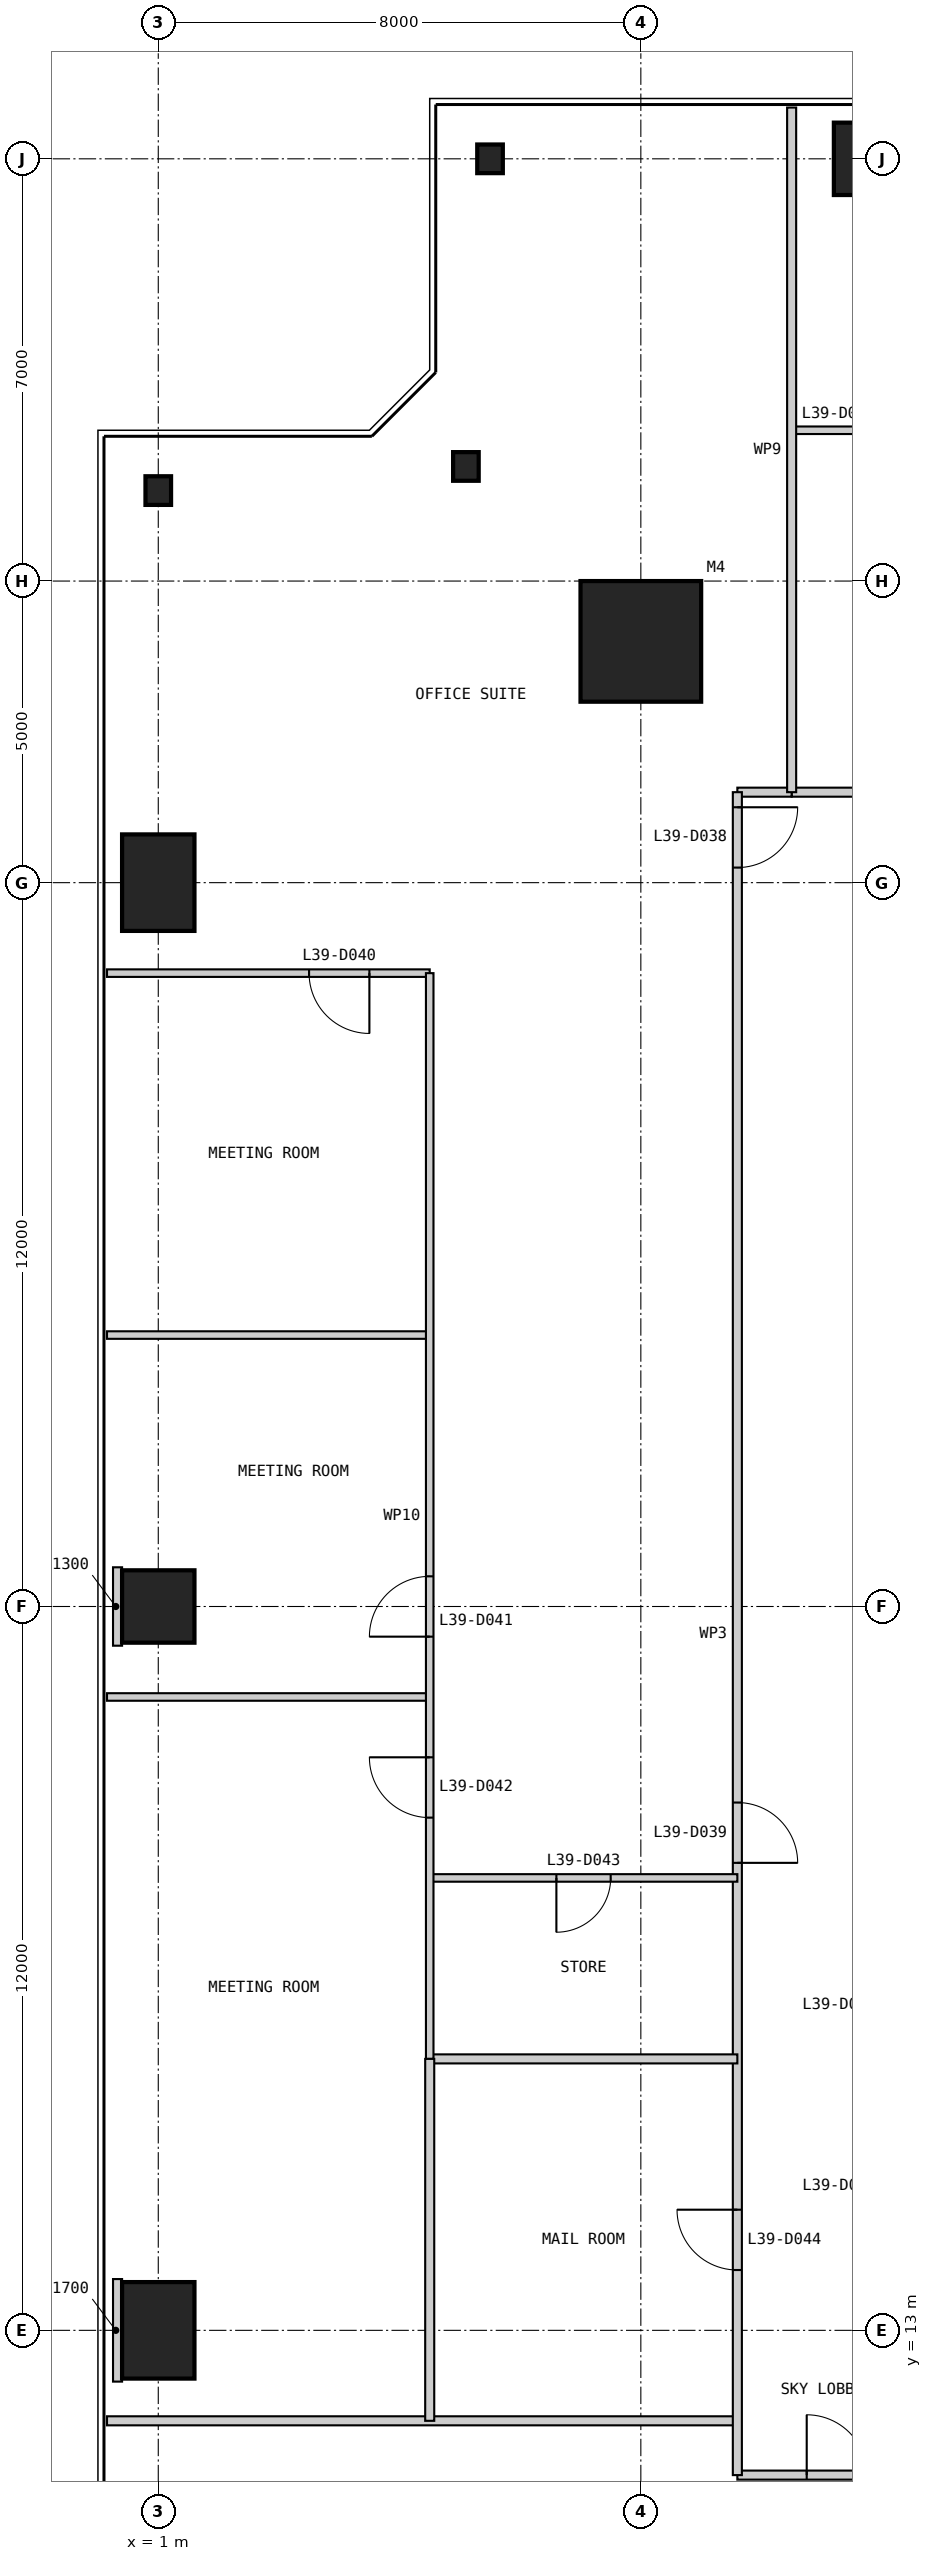
"""IFC4 building model, lengths in metres.
Left out: names, types, materials, properties, quantities, classifications, styles, units other than length and angle.
Written with IfcOpenShell. Run it as: python <this file> out.ifc"""

import sys

from ifc_helpers import new_model, si_unit, direction, frame, frame_2d, origin, origin_2d, place, context, subcontext, project, spatial, rectangle, i_section, extrude, element, fill, save


model = new_model("IFC4")
c1 = context("Model", 3, precision=1e-05, world=origin(), true_north=direction((0.0, 1.0)))
c2 = subcontext(c1, "Body", "Model", "MODEL_VIEW")
j1 = project(units=[si_unit("LENGTHUNIT", "METRE"), si_unit("PLANEANGLEUNIT", "RADIAN")], contexts=[c1])
p1 = place(None, origin())
s1 = spatial("IfcSite", under=j1, at=p1, CompositionType="ELEMENT")
p2 = place(p1, origin())
s2 = spatial("IfcBuilding", under=s1, at=p2, CompositionType="ELEMENT")
p3 = place(p2, frame((0.0, 0.0, 168.4)))
s3 = spatial("IfcBuildingStorey", under=s2, at=p3, CompositionType="ELEMENT", Elevation=168.4)
p4 = place(p3, frame((9.0, 41.0, 0.0), z_axis=(0.0, 0.0, 1.0), x_axis=(1.0, 0.0, 0.0)))
e1 = element("IfcColumn", 1, at=p4, inside=s3, PredefinedType="COLUMN", context=c2, shape_type="SweptSolid", body=[
    extrude(rectangle(XDim=2.0, YDim=2.0, at=origin_2d()), origin(), (0.0, 0.0, 1.0), 5.4),
])
p5 = place(p3, frame((13.0, 49.0, 0.0), z_axis=(0.0, 0.0, 1.0), x_axis=(1.0, 0.0, 0.0)))
e2 = element("IfcColumn", 2, at=p5, inside=s3, PredefinedType="COLUMN", context=c2, shape_type="SweptSolid", body=[
    extrude(rectangle(XDim=1.6, YDim=1.2, at=origin_2d()), origin(), (0.0, 0.0, 1.0), 5.4),
])
for number, where, z_axis, x_axis in (
    (3, (6.5, 49.0, 0.0), (0.0, 0.0, 1.0), (1.0, 0.0, 0.0)),
    (4, (6.1, 43.9, 0.0), (0.0, 0.0, 1.0), (1.0, 0.0, 0.0)),
    (5, (1.0, 43.5, 0.0), (0.0, 0.0, 1.0), (1.0, 0.0, 0.0)),
):
    element("IfcColumn", number, at=place(p3, frame(where, z_axis=z_axis, x_axis=x_axis)), inside=s3, PredefinedType="COLUMN", context=c2, shape_type="SweptSolid", body=[
        extrude(i_section(OverallWidth=0.424, OverallDepth=0.475, WebThickness=0.048, FlangeThickness=0.077, at=origin_2d()), origin(), (0.0, 0.0, 1.0), 5.4),
    ])
p6 = place(p3, frame((1.0, 37.0, 0.0), z_axis=(0.0, 0.0, 1.0), x_axis=(1.0, 0.0, 0.0)))
e6 = element("IfcColumn", 6, at=p6, inside=s3, PredefinedType="COLUMN", context=c2, shape_type="SweptSolid", body=[
    extrude(rectangle(XDim=1.2, YDim=1.6, at=origin_2d()), origin(), (0.0, 0.0, 1.0), 5.4),
])
p7 = place(p3, frame((1.0, 25.0, 0.0), z_axis=(0.0, 0.0, 1.0), x_axis=(1.0, 0.0, 0.0)))
e7 = element("IfcColumn", 7, at=p7, inside=s3, PredefinedType="COLUMN", context=c2, shape_type="SweptSolid", body=[
    extrude(rectangle(XDim=1.2, YDim=1.2, at=origin_2d()), origin(), (0.0, 0.0, 1.0), 5.4),
])
p8 = place(p3, frame((1.0, 13.0, 0.0), z_axis=(0.0, 0.0, 1.0), x_axis=(1.0, 0.0, 0.0)))
e8 = element("IfcColumn", 8, at=p8, inside=s3, PredefinedType="COLUMN", context=c2, shape_type="SweptSolid", body=[
    extrude(rectangle(XDim=1.2, YDim=1.6, at=origin_2d()), origin(), (0.0, 0.0, 1.0), 5.4),
])
p9 = place(p3, frame((10.6, 10.6, 0.0), z_axis=(0.0, 0.0, 1.0), x_axis=(1.0, 0.0, 0.0)))
e9 = element("IfcWall", 9, at=p9, inside=s3, PredefinedType="PARTITIONING", context=c2, shape_type="SweptSolid", body=[
    extrude(rectangle(XDim=28.8, YDim=0.15, at=frame_2d((14.4, 0.0))), origin(), (0.0, 0.0, 1.0), 5.25),
])
p10 = place(p9, frame((1.15, 0.0, 0.0)))
e10 = element("IfcOpeningElement", 10, at=p10, cuts=e9, PredefinedType="OPENING", context=c2, shape_type="SweptSolid", body=[
    extrude(rectangle(XDim=1.0, YDim=2.2, at=frame_2d((0.5, 1.1))), frame((0.0, 0.085, 0.0), z_axis=(0.0, -1.0, 0.0), x_axis=(1.0, 0.0, 0.0)), (0.0, 0.0, 1.0), 0.17),
])
p11 = place(p9, frame((11.65, 0.0, 0.0)))
e11 = element("IfcOpeningElement", 11, at=p11, cuts=e9, PredefinedType="OPENING", context=c2, shape_type="SweptSolid", body=[
    extrude(rectangle(XDim=1.0, YDim=2.2, at=frame_2d((0.5, 1.1))), frame((0.0, 0.085, 0.0), z_axis=(0.0, -1.0, 0.0), x_axis=(1.0, 0.0, 0.0)), (0.0, 0.0, 1.0), 0.17),
])
p12 = place(p9, frame((16.9, 0.0, 0.0)))
e12 = element("IfcOpeningElement", 12, at=p12, cuts=e9, PredefinedType="OPENING", context=c2, shape_type="SweptSolid", body=[
    extrude(rectangle(XDim=1.0, YDim=2.2, at=frame_2d((0.5, 1.1))), frame((0.0, 0.085, 0.0), z_axis=(0.0, -1.0, 0.0), x_axis=(1.0, 0.0, 0.0)), (0.0, 0.0, 1.0), 0.17),
])
p13 = place(p3, frame((0.15, 11.5, 0.0), z_axis=(0.0, 0.0, 1.0), x_axis=(1.0, 0.0, 0.0)))
e13 = element("IfcWall", 13, at=p13, inside=s3, PredefinedType="PARTITIONING", context=c2, shape_type="SweptSolid", body=[
    extrude(rectangle(XDim=10.45, YDim=0.15, at=frame_2d((5.225, 0.0))), origin(), (0.0, 0.0, 1.0), 5.25),
])
p14 = place(p3, frame((38.5, 38.5, 0.0), z_axis=(0.0, 0.0, 1.0), x_axis=(-1.0, 0.0, 0.0)))
e14 = element("IfcWall", 14, at=p14, inside=s3, PredefinedType="PARTITIONING", context=c2, shape_type="SweptSolid", body=[
    extrude(rectangle(XDim=27.0, YDim=0.15, at=frame_2d((13.5, 0.0))), origin(), (0.0, 0.0, 1.0), 5.25),
])
p15 = place(p14, frame((2.5, 0.0, 0.0)))
e15 = element("IfcOpeningElement", 15, at=p15, cuts=e14, PredefinedType="OPENING", context=c2, shape_type="SweptSolid", body=[
    extrude(rectangle(XDim=1.0, YDim=2.2, at=frame_2d((0.5, 1.1))), frame((0.0, 0.085, 0.0), z_axis=(0.0, -1.0, 0.0), x_axis=(1.0, 0.0, 0.0)), (0.0, 0.0, 1.0), 0.17),
])
p16 = place(p14, frame((7.0, 0.0, 0.0)))
e16 = element("IfcOpeningElement", 16, at=p16, cuts=e14, PredefinedType="OPENING", context=c2, shape_type="SweptSolid", body=[
    extrude(rectangle(XDim=1.0, YDim=2.2, at=frame_2d((0.5, 1.1))), frame((0.0, 0.085, 0.0), z_axis=(0.0, -1.0, 0.0), x_axis=(1.0, 0.0, 0.0)), (0.0, 0.0, 1.0), 0.17),
])
p17 = place(p14, frame((14.5, 0.0, 0.0)))
e17 = element("IfcOpeningElement", 17, at=p17, cuts=e14, PredefinedType="OPENING", context=c2, shape_type="SweptSolid", body=[
    extrude(rectangle(XDim=1.0, YDim=2.2, at=frame_2d((0.5, 1.1))), frame((0.0, 0.085, 0.0), z_axis=(0.0, -1.0, 0.0), x_axis=(1.0, 0.0, 0.0)), (0.0, 0.0, 1.0), 0.17),
])
p18 = place(p3, frame((17.5, 44.5, 0.0), z_axis=(0.0, 0.0, 1.0), x_axis=(-1.0, 0.0, 0.0)))
e18 = element("IfcWall", 18, at=p18, inside=s3, PredefinedType="PARTITIONING", context=c2, shape_type="SweptSolid", body=[
    extrude(rectangle(XDim=6.0, YDim=0.125, at=frame_2d((3.0, 0.0))), origin(), (0.0, 0.0, 1.0), 5.25),
])
p19 = place(p18, frame((4.05, 0.0, 0.0)))
e19 = element("IfcOpeningElement", 19, at=p19, cuts=e18, PredefinedType="OPENING", context=c2, shape_type="SweptSolid", body=[
    extrude(rectangle(XDim=0.9, YDim=2.2, at=frame_2d((0.45, 1.1))), frame((0.0, 0.073, 0.0), z_axis=(0.0, -1.0, 0.0), x_axis=(1.0, 0.0, 0.0)), (0.0, 0.0, 1.0), 0.145),
])
p20 = place(p3, frame((11.5, 38.5, 0.0), z_axis=(0.0, 0.0, 1.0), x_axis=(-1.0, 0.0, 0.0)))
e20 = element("IfcWall", 20, at=p20, inside=s3, PredefinedType="PARTITIONING", context=c2, shape_type="SweptSolid", body=[
    extrude(rectangle(XDim=0.9, YDim=0.15, at=frame_2d((0.45, 0.0))), origin(), (0.0, 0.0, 1.0), 5.25),
])
p21 = place(p3, frame((10.6, 38.5, 0.0), z_axis=(0.0, 0.0, 1.0), x_axis=(0.0, -1.0, 0.0)))
e21 = element("IfcWall", 21, at=p21, inside=s3, PredefinedType="PARTITIONING", context=c2, shape_type="SweptSolid", body=[
    extrude(rectangle(XDim=27.9, YDim=0.15, at=frame_2d((13.95, 0.0))), origin(), (0.0, 0.0, 1.0), 5.25),
])
p22 = place(p21, frame((0.25, 0.0, 0.0)))
e22 = element("IfcOpeningElement", 22, at=p22, cuts=e21, PredefinedType="OPENING", context=c2, shape_type="SweptSolid", body=[
    extrude(rectangle(XDim=1.0, YDim=2.2, at=frame_2d((0.5, 1.1))), frame((0.0, 0.085, 0.0), z_axis=(0.0, -1.0, 0.0), x_axis=(1.0, 0.0, 0.0)), (0.0, 0.0, 1.0), 0.17),
])
p23 = place(p21, frame((16.75, 0.0, 0.0)))
e23 = element("IfcOpeningElement", 23, at=p23, cuts=e21, PredefinedType="OPENING", context=c2, shape_type="SweptSolid", body=[
    extrude(rectangle(XDim=1.0, YDim=2.2, at=frame_2d((0.5, 1.1))), frame((0.0, 0.085, 0.0), z_axis=(0.0, -1.0, 0.0), x_axis=(1.0, 0.0, 0.0)), (0.0, 0.0, 1.0), 0.17),
])
p24 = place(p21, frame((23.5, 0.0, 0.0)))
e24 = element("IfcOpeningElement", 24, at=p24, cuts=e21, PredefinedType="OPENING", context=c2, shape_type="SweptSolid", body=[
    extrude(rectangle(XDim=1.0, YDim=2.2, at=frame_2d((0.5, 1.1))), frame((0.0, 0.085, 0.0), z_axis=(0.0, -1.0, 0.0), x_axis=(1.0, 0.0, 0.0)), (0.0, 0.0, 1.0), 0.17),
])
p25 = place(p3, frame((11.5, 49.85, 0.0), z_axis=(0.0, 0.0, 1.0), x_axis=(0.0, -1.0, 0.0)))
e25 = element("IfcWall", 25, at=p25, inside=s3, PredefinedType="PARTITIONING", context=c2, shape_type="SweptSolid", body=[
    extrude(rectangle(XDim=11.35, YDim=0.15, at=frame_2d((5.675, 0.0))), origin(), (0.0, 0.0, 1.0), 5.25),
])
p26 = place(p3, frame((0.15, 35.5, 0.0), z_axis=(0.0, 0.0, 1.0), x_axis=(1.0, 0.0, 0.0)))
e26 = element("IfcWall", 26, at=p26, inside=s3, PredefinedType="PARTITIONING", context=c2, shape_type="SweptSolid", body=[
    extrude(rectangle(XDim=5.35, YDim=0.125, at=frame_2d((2.675, 0.0))), origin(), (0.0, 0.0, 1.0), 5.25),
])
p27 = place(p26, frame((3.35, 0.0, 0.0)))
e27 = element("IfcOpeningElement", 27, at=p27, cuts=e26, PredefinedType="OPENING", context=c2, shape_type="SweptSolid", body=[
    extrude(rectangle(XDim=1.0, YDim=2.2, at=frame_2d((0.5, 1.1))), frame((0.0, 0.073, 0.0), z_axis=(0.0, -1.0, 0.0), x_axis=(1.0, 0.0, 0.0)), (0.0, 0.0, 1.0), 0.145),
])
for number, where, z_axis, x_axis in (
    (28, (0.15, 29.5, 0.0), (0.0, 0.0, 1.0), (1.0, 0.0, 0.0)),
    (29, (0.15, 23.5, 0.0), (0.0, 0.0, 1.0), (1.0, 0.0, 0.0)),
):
    element("IfcWall", number, at=place(p3, frame(where, z_axis=z_axis, x_axis=x_axis)), inside=s3, PredefinedType="PARTITIONING", context=c2, shape_type="SweptSolid", body=[
        extrude(rectangle(XDim=5.35, YDim=0.125, at=frame_2d((2.675, 0.0))), origin(), (0.0, 0.0, 1.0), 5.25),
    ])
p28 = place(p3, frame((5.5, 20.5, 0.0), z_axis=(0.0, 0.0, 1.0), x_axis=(1.0, 0.0, 0.0)))
e30 = element("IfcWall", 30, at=p28, inside=s3, PredefinedType="PARTITIONING", context=c2, shape_type="SweptSolid", body=[
    extrude(rectangle(XDim=5.1, YDim=0.125, at=frame_2d((2.55, 0.0))), origin(), (0.0, 0.0, 1.0), 5.25),
])
p29 = place(p28, frame((2.1, 0.0, 0.0)))
e31 = element("IfcOpeningElement", 31, at=p29, cuts=e30, PredefinedType="OPENING", context=c2, shape_type="SweptSolid", body=[
    extrude(rectangle(XDim=0.9, YDim=2.2, at=frame_2d((0.45, 1.1))), frame((0.0, 0.073, 0.0), z_axis=(0.0, -1.0, 0.0), x_axis=(1.0, 0.0, 0.0)), (0.0, 0.0, 1.0), 0.145),
])
p30 = place(p3, frame((5.5, 17.5, 0.0), z_axis=(0.0, 0.0, 1.0), x_axis=(1.0, 0.0, 0.0)))
e32 = element("IfcWall", 32, at=p30, inside=s3, PredefinedType="PARTITIONING", context=c2, shape_type="SweptSolid", body=[
    extrude(rectangle(XDim=5.1, YDim=0.15, at=frame_2d((2.55, 0.0))), origin(), (0.0, 0.0, 1.0), 5.25),
])
p31 = place(p3, frame((5.5, 35.5, 0.0), z_axis=(0.0, 0.0, 1.0), x_axis=(0.0, -1.0, 0.0)))
e33 = element("IfcWall", 33, at=p31, inside=s3, PredefinedType="PARTITIONING", context=c2, shape_type="SweptSolid", body=[
    extrude(rectangle(XDim=18.0, YDim=0.125, at=frame_2d((9.0, 0.0))), origin(), (0.0, 0.0, 1.0), 5.25),
])
p32 = place(p31, frame((10.0, 0.0, 0.0)))
e34 = element("IfcOpeningElement", 34, at=p32, cuts=e33, PredefinedType="OPENING", context=c2, shape_type="SweptSolid", body=[
    extrude(rectangle(XDim=1.0, YDim=2.2, at=frame_2d((0.5, 1.1))), frame((0.0, 0.073, 0.0), z_axis=(0.0, -1.0, 0.0), x_axis=(1.0, 0.0, 0.0)), (0.0, 0.0, 1.0), 0.145),
])
p33 = place(p31, frame((13.0, 0.0, 0.0)))
e35 = element("IfcOpeningElement", 35, at=p33, cuts=e33, PredefinedType="OPENING", context=c2, shape_type="SweptSolid", body=[
    extrude(rectangle(XDim=1.0, YDim=2.2, at=frame_2d((0.5, 1.1))), frame((0.0, 0.073, 0.0), z_axis=(0.0, -1.0, 0.0), x_axis=(1.0, 0.0, 0.0)), (0.0, 0.0, 1.0), 0.145),
])
p34 = place(p3, frame((5.5, 17.5, 0.0), z_axis=(0.0, 0.0, 1.0), x_axis=(0.0, -1.0, 0.0)))
e36 = element("IfcWall", 36, at=p34, inside=s3, PredefinedType="PARTITIONING", context=c2, shape_type="SweptSolid", body=[
    extrude(rectangle(XDim=6.0, YDim=0.15, at=frame_2d((3.0, 0.0))), origin(), (0.0, 0.0, 1.0), 5.25),
])
p35 = place(p3, frame((0.25, 25.0, 0.0), z_axis=(0.0, 0.0, 1.0), x_axis=(1.0, 0.0, 0.0)))
e37 = element("IfcWall", 37, at=p35, inside=s3, PredefinedType="PARTITIONING", context=c2, shape_type="SweptSolid", body=[
    extrude(rectangle(XDim=0.15, YDim=1.3, at=frame_2d((0.075, 0.0))), origin(), (0.0, 0.0, 1.0), 5.25),
])
p36 = place(p3, frame((0.25, 13.0, 0.0), z_axis=(0.0, 0.0, 1.0), x_axis=(1.0, 0.0, 0.0)))
e38 = element("IfcWall", 38, at=p36, inside=s3, PredefinedType="PARTITIONING", context=c2, shape_type="SweptSolid", body=[
    extrude(rectangle(XDim=0.15, YDim=1.7, at=frame_2d((0.075, 0.0))), origin(), (0.0, 0.0, 1.0), 5.25),
])
p37 = place(p10, origin())
e39 = element("IfcDoor", 39, at=p37, inside=s3, OperationType="SINGLE_SWING_LEFT", PredefinedType="DOOR", context=c2, shape_type="SweptSolid", body=[
    extrude(rectangle(XDim=1.0, YDim=2.2, at=frame_2d((0.5, 1.1))), frame((0.0, 0.025, 0.0), z_axis=(0.0, -1.0, 0.0), x_axis=(1.0, 0.0, 0.0)), (0.0, 0.0, 1.0), 0.05),
])
fill(e10, e39)
p38 = place(p22, origin())
e40 = element("IfcDoor", 40, at=p38, inside=s3, OperationType="SINGLE_SWING_LEFT", PredefinedType="DOOR", context=c2, shape_type="SweptSolid", body=[
    extrude(rectangle(XDim=1.0, YDim=2.2, at=frame_2d((0.5, 1.1))), frame((0.0, 0.025, 0.0), z_axis=(0.0, -1.0, 0.0), x_axis=(1.0, 0.0, 0.0)), (0.0, 0.0, 1.0), 0.05),
])
fill(e22, e40)
p39 = place(p23, origin())
e41 = element("IfcDoor", 41, at=p39, inside=s3, OperationType="SINGLE_SWING_RIGHT", PredefinedType="DOOR", context=c2, shape_type="SweptSolid", body=[
    extrude(rectangle(XDim=1.0, YDim=2.2, at=frame_2d((0.5, 1.1))), frame((0.0, 0.025, 0.0), z_axis=(0.0, -1.0, 0.0), x_axis=(1.0, 0.0, 0.0)), (0.0, 0.0, 1.0), 0.05),
])
fill(e23, e41)
p40 = place(p27, frame((1.0, 0.0, 0.0), z_axis=(0.0, 0.0, 1.0), x_axis=(-1.0, 0.0, 0.0)))
e42 = element("IfcDoor", 42, at=p40, inside=s3, OperationType="SINGLE_SWING_LEFT", PredefinedType="DOOR", context=c2, shape_type="SweptSolid", body=[
    extrude(rectangle(XDim=1.0, YDim=2.2, at=frame_2d((0.5, 1.1))), frame((0.0, 0.025, 0.0), z_axis=(0.0, -1.0, 0.0), x_axis=(1.0, 0.0, 0.0)), (0.0, 0.0, 1.0), 0.05),
])
fill(e27, e42)
p41 = place(p32, frame((1.0, 0.0, 0.0), z_axis=(0.0, 0.0, 1.0), x_axis=(-1.0, 0.0, 0.0)))
e43 = element("IfcDoor", 43, at=p41, inside=s3, OperationType="SINGLE_SWING_LEFT", PredefinedType="DOOR", context=c2, shape_type="SweptSolid", body=[
    extrude(rectangle(XDim=1.0, YDim=2.2, at=frame_2d((0.5, 1.1))), frame((0.0, 0.025, 0.0), z_axis=(0.0, -1.0, 0.0), x_axis=(1.0, 0.0, 0.0)), (0.0, 0.0, 1.0), 0.05),
])
fill(e34, e43)
p42 = place(p33, frame((1.0, 0.0, 0.0), z_axis=(0.0, 0.0, 1.0), x_axis=(-1.0, 0.0, 0.0)))
e44 = element("IfcDoor", 44, at=p42, inside=s3, OperationType="SINGLE_SWING_RIGHT", PredefinedType="DOOR", context=c2, shape_type="SweptSolid", body=[
    extrude(rectangle(XDim=1.0, YDim=2.2, at=frame_2d((0.5, 1.1))), frame((0.0, 0.025, 0.0), z_axis=(0.0, -1.0, 0.0), x_axis=(1.0, 0.0, 0.0)), (0.0, 0.0, 1.0), 0.05),
])
fill(e35, e44)
p43 = place(p29, frame((0.9, 0.0, 0.0), z_axis=(0.0, 0.0, 1.0), x_axis=(-1.0, 0.0, 0.0)))
e45 = element("IfcDoor", 45, at=p43, inside=s3, OperationType="SINGLE_SWING_RIGHT", PredefinedType="DOOR", context=c2, shape_type="SweptSolid", body=[
    extrude(rectangle(XDim=0.9, YDim=2.2, at=frame_2d((0.45, 1.1))), frame((0.0, 0.025, 0.0), z_axis=(0.0, -1.0, 0.0), x_axis=(1.0, 0.0, 0.0)), (0.0, 0.0, 1.0), 0.05),
])
fill(e31, e45)
p44 = place(p24, frame((1.0, 0.0, 0.0), z_axis=(0.0, 0.0, 1.0), x_axis=(-1.0, 0.0, 0.0)))
e46 = element("IfcDoor", 46, at=p44, inside=s3, OperationType="SINGLE_SWING_RIGHT", PredefinedType="DOOR", context=c2, shape_type="SweptSolid", body=[
    extrude(rectangle(XDim=1.0, YDim=2.2, at=frame_2d((0.5, 1.1))), frame((0.0, 0.025, 0.0), z_axis=(0.0, -1.0, 0.0), x_axis=(1.0, 0.0, 0.0)), (0.0, 0.0, 1.0), 0.05),
])
fill(e24, e46)
save(model, sys.argv[1])
